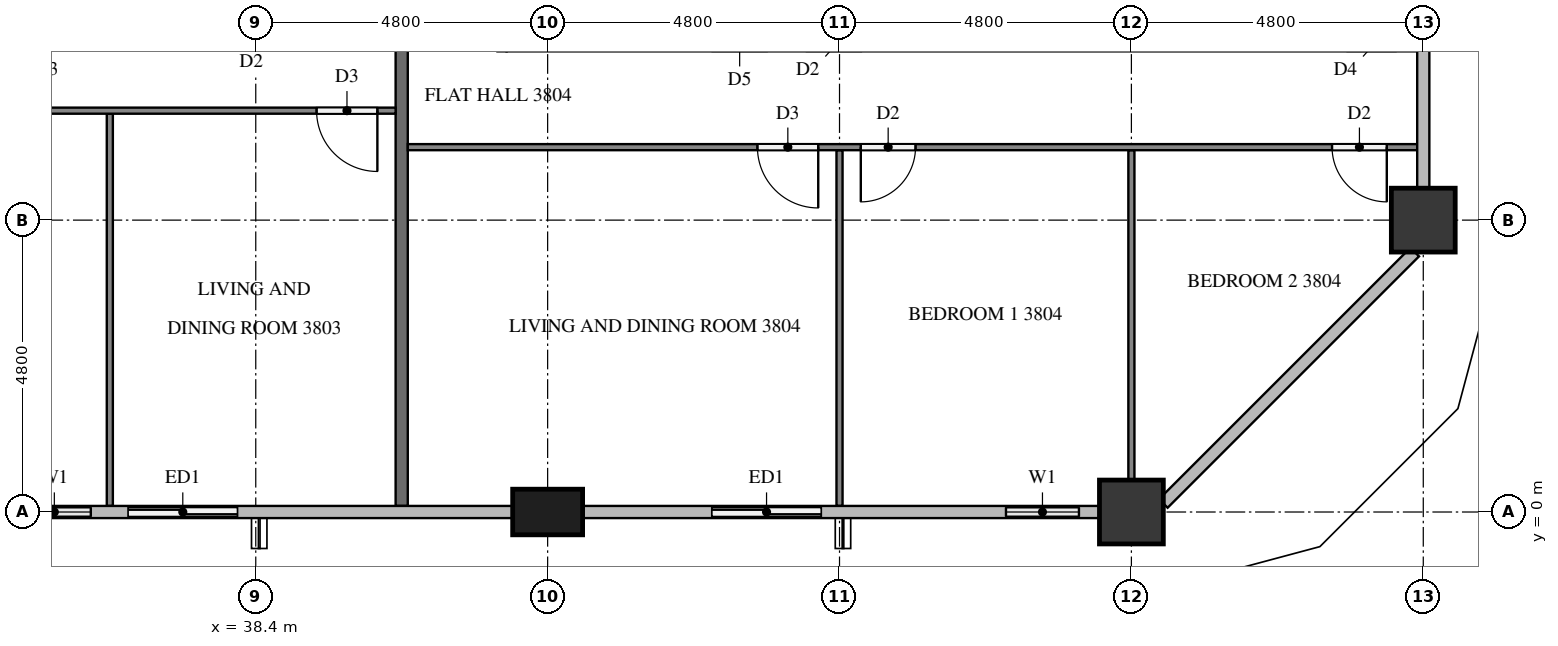
"""IFC4 building model, lengths in metres.
Left out: names, types, materials, properties, quantities, classifications, styles, units other than length and angle.
Written with IfcOpenShell. Run it as: python <this file> out.ifc"""

import sys

from ifc_helpers import new_model, si_unit, direction, frame, frame_2d, origin, origin_2d, place, context, subcontext, project, spatial, rectangle, extrude, element, fill, save


model = new_model("IFC4")
c1 = context("Model", 3, precision=1e-05, world=origin(), true_north=direction((0.0, 1.0)))
c2 = subcontext(c1, "Body", "Model", "MODEL_VIEW")
j1 = project(units=[si_unit("LENGTHUNIT", "METRE"), si_unit("PLANEANGLEUNIT", "RADIAN")], contexts=[c1])
p1 = place(None, origin())
s1 = spatial("IfcSite", under=j1, at=p1, CompositionType="ELEMENT")
p2 = place(p1, origin())
s2 = spatial("IfcBuilding", under=s1, at=p2, CompositionType="ELEMENT")
p3 = place(p2, frame((0.0, 0.0, 149.0)))
s3 = spatial("IfcBuildingStorey", under=s2, at=p3, CompositionType="ELEMENT", Elevation=149.0)
p4 = place(p3, frame((43.2, 0.0, 0.0), z_axis=(0.0, 0.0, 1.0), x_axis=(1.0, 0.0, 0.0)))
e1 = element("IfcColumn", 1, at=p4, inside=s3, PredefinedType="COLUMN", context=c2, shape_type="SweptSolid", body=[
    extrude(rectangle(XDim=1.15, YDim=0.75, at=origin_2d()), origin(), (0.0, 0.0, 1.0), 3.2),
])
for number, where, z_axis, x_axis in (
    (2, (52.8, 0.0, 0.0), (0.0, 0.0, 1.0), (1.0, 0.0, 0.0)),
    (3, (57.6, 4.8, 0.0), (0.0, 0.0, 1.0), (1.0, 0.0, 0.0)),
):
    element("IfcColumn", number, at=place(p3, frame(where, z_axis=z_axis, x_axis=x_axis)), inside=s3, PredefinedType="COLUMN", context=c2, shape_type="SweptSolid", body=[
        extrude(rectangle(XDim=1.05, YDim=1.05, at=origin_2d()), origin(), (0.0, 0.0, 1.0), 3.2),
    ])
p5 = place(p3, frame((34.175, 0.0, 0.0), z_axis=(0.0, 0.0, 1.0), x_axis=(1.0, 0.0, 0.0)))
e4 = element("IfcWall", 4, at=p5, inside=s3, PredefinedType="SOLIDWALL", context=c2, shape_type="SweptSolid", body=[
    extrude(rectangle(XDim=4.225, YDim=0.15, at=frame_2d((2.112, 0.0))), origin(), (0.0, 0.0, 1.0), 3.2),
])
p6 = place(p5, frame((0.312, 0.0, 0.9)))
e5 = element("IfcOpeningElement", 5, at=p6, cuts=e4, PredefinedType="OPENING", context=c2, shape_type="SweptSolid", body=[
    extrude(rectangle(XDim=1.2, YDim=1.4, at=frame_2d((0.6, 0.7))), frame((0.0, 0.085, 0.0), z_axis=(0.0, -1.0, 0.0), x_axis=(1.0, 0.0, 0.0)), (0.0, 0.0, 1.0), 0.17),
])
p7 = place(p5, frame((2.125, 0.0, 0.0)))
e6 = element("IfcOpeningElement", 6, at=p7, cuts=e4, PredefinedType="OPENING", context=c2, shape_type="SweptSolid", body=[
    extrude(rectangle(XDim=1.8, YDim=2.4, at=frame_2d((0.9, 1.2))), frame((0.0, 0.085, 0.0), z_axis=(0.0, -1.0, 0.0), x_axis=(1.0, 0.0, 0.0)), (0.0, 0.0, 1.0), 0.17),
])
p8 = place(p3, frame((45.6, 0.0, 0.0), z_axis=(0.0, 0.0, 1.0), x_axis=(1.0, 0.0, 0.0)))
e7 = element("IfcWall", 7, at=p8, inside=s3, PredefinedType="SOLIDWALL", context=c2, shape_type="SweptSolid", body=[
    extrude(rectangle(XDim=2.4, YDim=0.15, at=frame_2d((1.2, 0.0))), origin(), (0.0, 0.0, 1.0), 3.2),
])
p9 = place(p8, frame((0.3, 0.0, 0.0)))
e8 = element("IfcOpeningElement", 8, at=p9, cuts=e7, PredefinedType="OPENING", context=c2, shape_type="SweptSolid", body=[
    extrude(rectangle(XDim=1.8, YDim=2.4, at=frame_2d((0.9, 1.2))), frame((0.0, 0.085, 0.0), z_axis=(0.0, -1.0, 0.0), x_axis=(1.0, 0.0, 0.0)), (0.0, 0.0, 1.0), 0.17),
])
p10 = place(p3, frame((50.4, 0.0, 0.0), z_axis=(0.0, 0.0, 1.0), x_axis=(1.0, 0.0, 0.0)))
e9 = element("IfcWall", 9, at=p10, inside=s3, PredefinedType="SOLIDWALL", context=c2, shape_type="SweptSolid", body=[
    extrude(rectangle(XDim=1.875, YDim=0.15, at=frame_2d((0.938, 0.0))), origin(), (0.0, 0.0, 1.0), 3.2),
])
p11 = place(p10, frame((0.337, 0.0, 0.9)))
e10 = element("IfcOpeningElement", 10, at=p11, cuts=e9, PredefinedType="OPENING", context=c2, shape_type="SweptSolid", body=[
    extrude(rectangle(XDim=1.2, YDim=1.4, at=frame_2d((0.6, 0.7))), frame((0.0, 0.085, 0.0), z_axis=(0.0, -1.0, 0.0), x_axis=(1.0, 0.0, 0.0)), (0.0, 0.0, 1.0), 0.17),
])
p12 = place(p3, frame((40.8, 11.9, 0.0), z_axis=(0.0, 0.0, 1.0), x_axis=(0.0, -1.0, 0.0)))
e11 = element("IfcWall", 11, at=p12, inside=s3, PredefinedType="PARTITIONING", context=c2, shape_type="SweptSolid", body=[
    extrude(rectangle(XDim=11.8, YDim=0.2, at=frame_2d((5.9, 0.0))), origin(), (0.0, 0.0, 1.0), 3.2),
])
p13 = place(p3, frame((36.0, 6.55, 0.0), z_axis=(0.0, 0.0, 1.0), x_axis=(0.0, -1.0, 0.0)))
e12 = element("IfcWall", 12, at=p13, inside=s3, PredefinedType="PARTITIONING", context=c2, shape_type="SweptSolid", body=[
    extrude(rectangle(XDim=6.45, YDim=0.1, at=frame_2d((3.225, 0.0))), origin(), (0.0, 0.0, 1.0), 3.2),
])
p14 = place(p3, frame((40.7, 6.6, 0.0), z_axis=(0.0, 0.0, 1.0), x_axis=(-1.0, 0.0, 0.0)))
e13 = element("IfcWall", 13, at=p14, inside=s3, PredefinedType="PARTITIONING", context=c2, shape_type="SweptSolid", body=[
    extrude(rectangle(XDim=14.2, YDim=0.1, at=frame_2d((7.1, 0.0))), origin(), (0.0, 0.0, 1.0), 3.2),
])
p15 = place(p14, frame((0.3, 0.0, 0.0)))
e14 = element("IfcOpeningElement", 14, at=p15, cuts=e13, PredefinedType="OPENING", context=c2, shape_type="SweptSolid", body=[
    extrude(rectangle(XDim=1.0, YDim=2.1, at=frame_2d((0.5, 1.05))), frame((0.0, 0.06, 0.0), z_axis=(0.0, -1.0, 0.0), x_axis=(1.0, 0.0, 0.0)), (0.0, 0.0, 1.0), 0.12),
])
p16 = place(p14, frame((8.25, 0.0, 0.0)))
e15 = element("IfcOpeningElement", 15, at=p16, cuts=e13, PredefinedType="OPENING", context=c2, shape_type="SweptSolid", body=[
    extrude(rectangle(XDim=0.9, YDim=2.1, at=frame_2d((0.45, 1.05))), frame((0.0, 0.06, 0.0), z_axis=(0.0, -1.0, 0.0), x_axis=(1.0, 0.0, 0.0)), (0.0, 0.0, 1.0), 0.12),
])
p17 = place(p14, frame((9.85, 0.0, 0.0)))
e16 = element("IfcOpeningElement", 16, at=p17, cuts=e13, PredefinedType="OPENING", context=c2, shape_type="SweptSolid", body=[
    extrude(rectangle(XDim=0.9, YDim=2.1, at=frame_2d((0.45, 1.05))), frame((0.0, 0.06, 0.0), z_axis=(0.0, -1.0, 0.0), x_axis=(1.0, 0.0, 0.0)), (0.0, 0.0, 1.0), 0.12),
])
p18 = place(p3, frame((48.0, 5.95, 0.0), z_axis=(0.0, 0.0, 1.0), x_axis=(0.0, -1.0, 0.0)))
e17 = element("IfcWall", 17, at=p18, inside=s3, PredefinedType="PARTITIONING", context=c2, shape_type="SweptSolid", body=[
    extrude(rectangle(XDim=5.85, YDim=0.1, at=frame_2d((2.925, 0.0))), origin(), (0.0, 0.0, 1.0), 3.2),
])
p19 = place(p3, frame((52.8, 5.95, 0.0), z_axis=(0.0, 0.0, 1.0), x_axis=(0.0, -1.0, 0.0)))
e18 = element("IfcWall", 18, at=p19, inside=s3, PredefinedType="PARTITIONING", context=c2, shape_type="SweptSolid", body=[
    extrude(rectangle(XDim=5.425, YDim=0.1, at=frame_2d((2.712, 0.0))), origin(), (0.0, 0.0, 1.0), 3.2),
])
p20 = place(p3, frame((57.5, 6.0, 0.0), z_axis=(0.0, 0.0, 1.0), x_axis=(-1.0, 0.0, 0.0)))
e19 = element("IfcWall", 19, at=p20, inside=s3, PredefinedType="PARTITIONING", context=c2, shape_type="SweptSolid", body=[
    extrude(rectangle(XDim=16.6, YDim=0.1, at=frame_2d((8.3, 0.0))), origin(), (0.0, 0.0, 1.0), 3.2),
])
p21 = place(p20, frame((9.85, 0.0, 0.0)))
e20 = element("IfcOpeningElement", 20, at=p21, cuts=e19, PredefinedType="OPENING", context=c2, shape_type="SweptSolid", body=[
    extrude(rectangle(XDim=1.0, YDim=2.1, at=frame_2d((0.5, 1.05))), frame((0.0, 0.06, 0.0), z_axis=(0.0, -1.0, 0.0), x_axis=(1.0, 0.0, 0.0)), (0.0, 0.0, 1.0), 0.12),
])
p22 = place(p20, frame((8.25, 0.0, 0.0)))
e21 = element("IfcOpeningElement", 21, at=p22, cuts=e19, PredefinedType="OPENING", context=c2, shape_type="SweptSolid", body=[
    extrude(rectangle(XDim=0.9, YDim=2.1, at=frame_2d((0.45, 1.05))), frame((0.0, 0.06, 0.0), z_axis=(0.0, -1.0, 0.0), x_axis=(1.0, 0.0, 0.0)), (0.0, 0.0, 1.0), 0.12),
])
p23 = place(p20, frame((0.5, 0.0, 0.0)))
e22 = element("IfcOpeningElement", 22, at=p23, cuts=e19, PredefinedType="OPENING", context=c2, shape_type="SweptSolid", body=[
    extrude(rectangle(XDim=0.9, YDim=2.1, at=frame_2d((0.45, 1.05))), frame((0.0, 0.06, 0.0), z_axis=(0.0, -1.0, 0.0), x_axis=(1.0, 0.0, 0.0)), (0.0, 0.0, 1.0), 0.12),
])
p24 = place(p6, origin())
e23 = element("IfcWindow", 23, at=p24, inside=s3, PartitioningType="SINGLE_PANEL", PredefinedType="WINDOW", context=c2, shape_type="SweptSolid", body=[
    extrude(rectangle(XDim=1.2, YDim=1.4, at=frame_2d((0.6, 0.7))), frame((0.0, 0.03, 0.0), z_axis=(0.0, -1.0, 0.0), x_axis=(1.0, 0.0, 0.0)), (0.0, 0.0, 1.0), 0.06),
])
fill(e5, e23)
p25 = place(p7, origin())
e24 = element("IfcDoor", 24, at=p25, inside=s3, OperationType="SLIDING_TO_LEFT", PredefinedType="DOOR", context=c2, shape_type="SweptSolid", body=[
    extrude(rectangle(XDim=1.8, YDim=2.4, at=frame_2d((0.9, 1.2))), frame((0.0, 0.025, 0.0), z_axis=(0.0, -1.0, 0.0), x_axis=(1.0, 0.0, 0.0)), (0.0, 0.0, 1.0), 0.05),
])
fill(e6, e24)
p26 = place(p9, origin())
e25 = element("IfcDoor", 25, at=p26, inside=s3, OperationType="SLIDING_TO_RIGHT", PredefinedType="DOOR", context=c2, shape_type="SweptSolid", body=[
    extrude(rectangle(XDim=1.8, YDim=2.4, at=frame_2d((0.9, 1.2))), frame((0.0, 0.025, 0.0), z_axis=(0.0, -1.0, 0.0), x_axis=(1.0, 0.0, 0.0)), (0.0, 0.0, 1.0), 0.05),
])
fill(e8, e25)
p27 = place(p11, origin())
e26 = element("IfcWindow", 26, at=p27, inside=s3, PartitioningType="SINGLE_PANEL", PredefinedType="WINDOW", context=c2, shape_type="SweptSolid", body=[
    extrude(rectangle(XDim=1.2, YDim=1.4, at=frame_2d((0.6, 0.7))), frame((0.0, 0.03, 0.0), z_axis=(0.0, -1.0, 0.0), x_axis=(1.0, 0.0, 0.0)), (0.0, 0.0, 1.0), 0.06),
])
fill(e10, e26)
p28 = place(p15, origin())
e27 = element("IfcDoor", 27, at=p28, inside=s3, OperationType="SINGLE_SWING_LEFT", PredefinedType="DOOR", context=c2, shape_type="SweptSolid", body=[
    extrude(rectangle(XDim=1.0, YDim=2.1, at=frame_2d((0.5, 1.05))), frame((0.0, 0.025, 0.0), z_axis=(0.0, -1.0, 0.0), x_axis=(1.0, 0.0, 0.0)), (0.0, 0.0, 1.0), 0.05),
])
fill(e14, e27)
p29 = place(p21, origin())
e28 = element("IfcDoor", 28, at=p29, inside=s3, OperationType="SINGLE_SWING_LEFT", PredefinedType="DOOR", context=c2, shape_type="SweptSolid", body=[
    extrude(rectangle(XDim=1.0, YDim=2.1, at=frame_2d((0.5, 1.05))), frame((0.0, 0.025, 0.0), z_axis=(0.0, -1.0, 0.0), x_axis=(1.0, 0.0, 0.0)), (0.0, 0.0, 1.0), 0.05),
])
fill(e20, e28)
p30 = place(p22, origin())
e29 = element("IfcDoor", 29, at=p30, inside=s3, OperationType="SINGLE_SWING_RIGHT", PredefinedType="DOOR", context=c2, shape_type="SweptSolid", body=[
    extrude(rectangle(XDim=0.9, YDim=2.1, at=frame_2d((0.45, 1.05))), frame((0.0, 0.025, 0.0), z_axis=(0.0, -1.0, 0.0), x_axis=(1.0, 0.0, 0.0)), (0.0, 0.0, 1.0), 0.05),
])
fill(e21, e29)
p31 = place(p23, origin())
e30 = element("IfcDoor", 30, at=p31, inside=s3, OperationType="SINGLE_SWING_LEFT", PredefinedType="DOOR", context=c2, shape_type="SweptSolid", body=[
    extrude(rectangle(XDim=0.9, YDim=2.1, at=frame_2d((0.45, 1.05))), frame((0.0, 0.025, 0.0), z_axis=(0.0, -1.0, 0.0), x_axis=(1.0, 0.0, 0.0)), (0.0, 0.0, 1.0), 0.05),
])
fill(e22, e30)
save(model, sys.argv[1])
